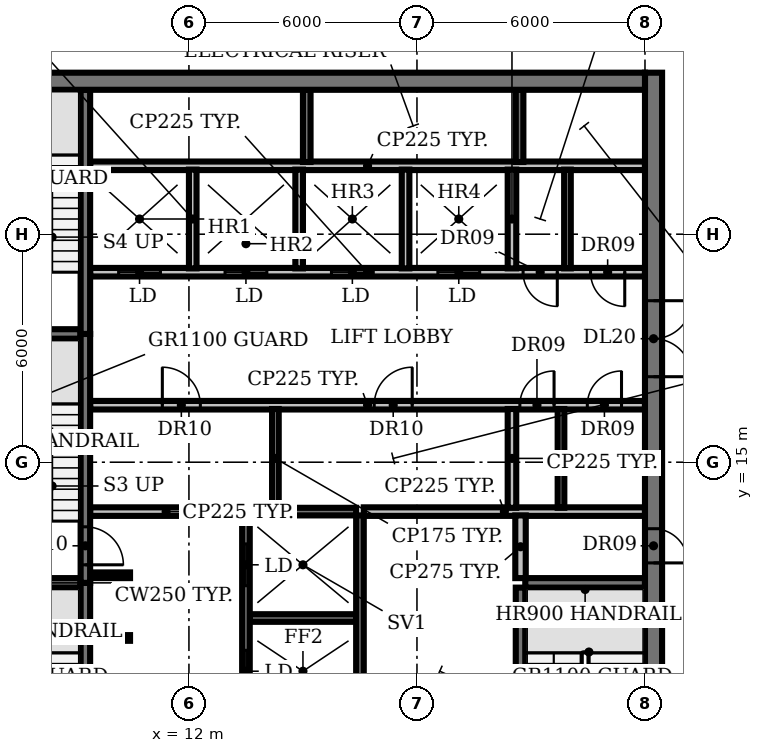
"""IFC4 building model, lengths in metres.
Left out: names, types, materials, properties, quantities, classifications, styles, units other than length and angle.
Written with IfcOpenShell. Run it as: python <this file> out.ifc"""

import sys

from ifc_helpers import new_model, si_unit, direction, frame, frame_2d, origin, place, context, subcontext, project, spatial, rectangle, extrude, element, fill, save


model = new_model("IFC4")
c1 = context("Model", 3, precision=1e-05, world=origin(), true_north=direction((0.0, 1.0)))
c2 = subcontext(c1, "Body", "Model", "MODEL_VIEW")
j1 = project(units=[si_unit("LENGTHUNIT", "METRE"), si_unit("PLANEANGLEUNIT", "RADIAN")], contexts=[c1])
p1 = place(None, origin())
s1 = spatial("IfcSite", under=j1, at=p1, CompositionType="ELEMENT")
p2 = place(p1, origin())
s2 = spatial("IfcBuilding", under=s1, at=p2, CompositionType="ELEMENT")
p3 = place(p2, frame((0.0, 0.0, 218.0)))
s3 = spatial("IfcBuildingStorey", under=s2, at=p3, CompositionType="ELEMENT", Elevation=218.0)
p4 = place(p3, frame((9.4, 10.375, 0.0), z_axis=(0.0, 0.0, 1.0), x_axis=(1.0, 0.0, 0.0)))
e1 = element("IfcWall", 1, at=p4, inside=s3, PredefinedType="SHEAR", context=c2, shape_type="SweptSolid", body=[
    extrude(rectangle(XDim=1.05, YDim=0.15, at=frame_2d((0.525, 0.0))), origin(), (0.0, 0.0, 1.0), 3.85),
])
p5 = place(p3, frame((13.6, 10.9, 0.0), z_axis=(0.0, 0.0, 1.0), x_axis=(1.0, 0.0, 0.0)))
e2 = element("IfcWall", 2, at=p5, inside=s3, PredefinedType="SHEAR", context=c2, shape_type="SweptSolid", body=[
    extrude(rectangle(XDim=2.8, YDim=0.2, at=frame_2d((1.4, 0.0))), origin(), (0.0, 0.0, 1.0), 3.85),
])
for number, where, z_axis, x_axis in (
    (3, (6.0, 11.825, 0.0), (0.0, 0.0, 1.0), (1.0, 0.0, 0.0)),
    (4, (20.85, 11.825, 0.0), (0.0, 0.0, 1.0), (1.0, 0.0, 0.0)),
):
    element("IfcWall", number, at=place(p3, frame(where, z_axis=z_axis, x_axis=x_axis)), inside=s3, PredefinedType="SHEAR", context=c2, shape_type="SweptSolid", body=[
        extrude(rectangle(XDim=3.15, YDim=0.25, at=frame_2d((1.575, 0.0))), origin(), (0.0, 0.0, 1.0), 3.85),
    ])
p6 = place(p3, frame((9.4, 12.025, 0.0), z_axis=(0.0, 0.0, 1.0), x_axis=(1.0, 0.0, 0.0)))
e5 = element("IfcWall", 5, at=p6, inside=s3, PredefinedType="SHEAR", context=c2, shape_type="SweptSolid", body=[
    extrude(rectangle(XDim=1.05, YDim=0.15, at=frame_2d((0.525, 0.0))), origin(), (0.0, 0.0, 1.0), 3.85),
])
p7 = place(p3, frame((9.4, 13.7, 0.0), z_axis=(0.0, 0.0, 1.0), x_axis=(1.0, 0.0, 0.0)))
e6 = element("IfcWall", 6, at=p7, inside=s3, PredefinedType="PARTITIONING", context=c2, shape_type="SweptSolid", body=[
    extrude(rectangle(XDim=4.0, YDim=0.225, at=frame_2d((2.0, 0.0))), origin(), (0.0, 0.0, 1.0), 3.85),
])
p8 = place(p3, frame((13.6, 13.7, 0.0), z_axis=(0.0, 0.0, 1.0), x_axis=(1.0, 0.0, 0.0)))
e7 = element("IfcWall", 7, at=p8, inside=s3, PredefinedType="SHEAR", context=c2, shape_type="SweptSolid", body=[
    extrude(rectangle(XDim=2.8, YDim=0.2, at=frame_2d((1.4, 0.0))), origin(), (0.0, 0.0, 1.0), 3.85),
])
p9 = place(p3, frame((16.6, 13.7, 0.0), z_axis=(0.0, 0.0, 1.0), x_axis=(1.0, 0.0, 0.0)))
e8 = element("IfcWall", 8, at=p9, inside=s3, PredefinedType="PARTITIONING", context=c2, shape_type="SweptSolid", body=[
    extrude(rectangle(XDim=7.4, YDim=0.225, at=frame_2d((3.7, 0.0))), origin(), (0.0, 0.0, 1.0), 3.85),
])
p10 = place(p3, frame((9.4, 16.5, 0.0), z_axis=(0.0, 0.0, 1.0), x_axis=(1.0, 0.0, 0.0)))
e9 = element("IfcWall", 9, at=p10, inside=s3, PredefinedType="PARTITIONING", context=c2, shape_type="SweptSolid", body=[
    extrude(rectangle(XDim=14.6, YDim=0.225, at=frame_2d((7.3, 0.0))), origin(), (0.0, 0.0, 1.0), 3.85),
])
p11 = place(p10, frame((1.9, 0.0, 0.0)))
e10 = element("IfcOpeningElement", 10, at=p11, cuts=e9, PredefinedType="OPENING", context=c2, shape_type="SweptSolid", body=[
    extrude(rectangle(XDim=1.0, YDim=2.1, at=frame_2d((0.5, 1.05))), frame((0.0, 0.123, 0.0), z_axis=(0.0, -1.0, 0.0), x_axis=(1.0, 0.0, 0.0)), (0.0, 0.0, 1.0), 0.245),
])
p12 = place(p10, frame((7.475, 0.0, 0.0)))
e11 = element("IfcOpeningElement", 11, at=p12, cuts=e9, PredefinedType="OPENING", context=c2, shape_type="SweptSolid", body=[
    extrude(rectangle(XDim=1.0, YDim=2.1, at=frame_2d((0.5, 1.05))), frame((0.0, 0.123, 0.0), z_axis=(0.0, -1.0, 0.0), x_axis=(1.0, 0.0, 0.0)), (0.0, 0.0, 1.0), 0.245),
])
p13 = place(p10, frame((11.308, 0.0, 0.0)))
e12 = element("IfcOpeningElement", 12, at=p13, cuts=e9, PredefinedType="OPENING", context=c2, shape_type="SweptSolid", body=[
    extrude(rectangle(XDim=0.9, YDim=2.1, at=frame_2d((0.45, 1.05))), frame((0.0, 0.123, 0.0), z_axis=(0.0, -1.0, 0.0), x_axis=(1.0, 0.0, 0.0)), (0.0, 0.0, 1.0), 0.245),
])
p14 = place(p10, frame((13.083, 0.0, 0.0)))
e13 = element("IfcOpeningElement", 13, at=p14, cuts=e9, PredefinedType="OPENING", context=c2, shape_type="SweptSolid", body=[
    extrude(rectangle(XDim=0.9, YDim=2.1, at=frame_2d((0.45, 1.05))), frame((0.0, 0.123, 0.0), z_axis=(0.0, -1.0, 0.0), x_axis=(1.0, 0.0, 0.0)), (0.0, 0.0, 1.0), 0.245),
])
p15 = place(p3, frame((6.0, 18.375, 0.0), z_axis=(0.0, 0.0, 1.0), x_axis=(1.0, 0.0, 0.0)))
e14 = element("IfcWall", 14, at=p15, inside=s3, PredefinedType="SHEAR", context=c2, shape_type="SweptSolid", body=[
    extrude(rectangle(XDim=3.15, YDim=0.25, at=frame_2d((1.575, 0.0))), origin(), (0.0, 0.0, 1.0), 3.85),
])
p16 = place(p3, frame((24.0, 20.0, 0.0), z_axis=(0.0, 0.0, 1.0), x_axis=(-1.0, 0.0, 0.0)))
e15 = element("IfcWall", 15, at=p16, inside=s3, PredefinedType="PARTITIONING", context=c2, shape_type="SweptSolid", body=[
    extrude(rectangle(XDim=14.6, YDim=0.225, at=frame_2d((7.3, 0.0))), origin(), (0.0, 0.0, 1.0), 3.85),
])
p17 = place(p16, frame((12.75, 0.0, 0.0)))
e16 = element("IfcOpeningElement", 16, at=p17, cuts=e15, PredefinedType="OPENING", context=c2, shape_type="SweptSolid", body=[
    extrude(rectangle(XDim=1.1, YDim=2.1, at=frame_2d((0.55, 1.05))), frame((0.0, 0.123, 0.0), z_axis=(0.0, -1.0, 0.0), x_axis=(1.0, 0.0, 0.0)), (0.0, 0.0, 1.0), 0.245),
])
p18 = place(p16, frame((9.95, 0.0, 0.0)))
e17 = element("IfcOpeningElement", 17, at=p18, cuts=e15, PredefinedType="OPENING", context=c2, shape_type="SweptSolid", body=[
    extrude(rectangle(XDim=1.1, YDim=2.1, at=frame_2d((0.55, 1.05))), frame((0.0, 0.123, 0.0), z_axis=(0.0, -1.0, 0.0), x_axis=(1.0, 0.0, 0.0)), (0.0, 0.0, 1.0), 0.245),
])
p19 = place(p16, frame((7.15, 0.0, 0.0)))
e18 = element("IfcOpeningElement", 18, at=p19, cuts=e15, PredefinedType="OPENING", context=c2, shape_type="SweptSolid", body=[
    extrude(rectangle(XDim=1.1, YDim=2.1, at=frame_2d((0.55, 1.05))), frame((0.0, 0.123, 0.0), z_axis=(0.0, -1.0, 0.0), x_axis=(1.0, 0.0, 0.0)), (0.0, 0.0, 1.0), 0.245),
])
p20 = place(p16, frame((4.35, 0.0, 0.0)))
e19 = element("IfcOpeningElement", 19, at=p20, cuts=e15, PredefinedType="OPENING", context=c2, shape_type="SweptSolid", body=[
    extrude(rectangle(XDim=1.1, YDim=2.1, at=frame_2d((0.55, 1.05))), frame((0.0, 0.123, 0.0), z_axis=(0.0, -1.0, 0.0), x_axis=(1.0, 0.0, 0.0)), (0.0, 0.0, 1.0), 0.245),
])
p21 = place(p16, frame((2.308, 0.0, 0.0)))
e20 = element("IfcOpeningElement", 20, at=p21, cuts=e15, PredefinedType="OPENING", context=c2, shape_type="SweptSolid", body=[
    extrude(rectangle(XDim=0.9, YDim=2.1, at=frame_2d((0.45, 1.05))), frame((0.0, 0.123, 0.0), z_axis=(0.0, -1.0, 0.0), x_axis=(1.0, 0.0, 0.0)), (0.0, 0.0, 1.0), 0.245),
])
p22 = place(p16, frame((0.532, 0.0, 0.0)))
e21 = element("IfcOpeningElement", 21, at=p22, cuts=e15, PredefinedType="OPENING", context=c2, shape_type="SweptSolid", body=[
    extrude(rectangle(XDim=0.9, YDim=2.1, at=frame_2d((0.45, 1.05))), frame((0.0, 0.123, 0.0), z_axis=(0.0, -1.0, 0.0), x_axis=(1.0, 0.0, 0.0)), (0.0, 0.0, 1.0), 0.245),
])
p23 = place(p3, frame((9.4, 22.8, 0.0), z_axis=(0.0, 0.0, 1.0), x_axis=(1.0, 0.0, 0.0)))
e22 = element("IfcWall", 22, at=p23, inside=s3, PredefinedType="PARTITIONING", context=c2, shape_type="SweptSolid", body=[
    extrude(rectangle(XDim=14.6, YDim=0.225, at=frame_2d((7.3, 0.0))), origin(), (0.0, 0.0, 1.0), 3.85),
])
p24 = place(p3, frame((9.275, 11.825, 0.0), z_axis=(0.0, 0.0, 1.0), x_axis=(0.0, -1.0, 0.0)))
e23 = element("IfcWall", 23, at=p24, inside=s3, PredefinedType="SHEAR", context=c2, shape_type="SweptSolid", body=[
    extrude(rectangle(XDim=6.425, YDim=0.25, at=frame_2d((3.212, 0.0))), origin(), (0.0, 0.0, 1.0), 3.85),
])
p25 = place(p24, frame((5.075, 0.0, 0.0)))
e24 = element("IfcOpeningElement", 24, at=p25, cuts=e23, PredefinedType="OPENING", context=c2, shape_type="SweptSolid", body=[
    extrude(rectangle(XDim=1.0, YDim=2.1, at=frame_2d((0.5, 1.05))), frame((0.0, 0.135, 0.0), z_axis=(0.0, -1.0, 0.0), x_axis=(1.0, 0.0, 0.0)), (0.0, 0.0, 1.0), 0.27),
])
p26 = place(p3, frame((9.275, 18.375, 0.0), z_axis=(0.0, 0.0, 1.0), x_axis=(0.0, -1.0, 0.0)))
e25 = element("IfcWall", 25, at=p26, inside=s3, PredefinedType="SHEAR", context=c2, shape_type="SweptSolid", body=[
    extrude(rectangle(XDim=6.55, YDim=0.25, at=frame_2d((3.275, 0.0))), origin(), (0.0, 0.0, 1.0), 3.85),
])
p27 = place(p26, frame((5.075, 0.0, 0.0)))
e26 = element("IfcOpeningElement", 26, at=p27, cuts=e25, PredefinedType="OPENING", context=c2, shape_type="SweptSolid", body=[
    extrude(rectangle(XDim=1.0, YDim=2.1, at=frame_2d((0.5, 1.05))), frame((0.0, 0.135, 0.0), z_axis=(0.0, -1.0, 0.0), x_axis=(1.0, 0.0, 0.0)), (0.0, 0.0, 1.0), 0.27),
])
p28 = place(p3, frame((9.275, 18.375, 0.0), z_axis=(0.0, 0.0, 1.0), x_axis=(0.0, 1.0, 0.0)))
e27 = element("IfcWall", 27, at=p28, inside=s3, PredefinedType="SHEAR", context=c2, shape_type="SweptSolid", body=[
    extrude(rectangle(XDim=6.425, YDim=0.25, at=frame_2d((3.212, 0.0))), origin(), (0.0, 0.0, 1.0), 3.85),
])
p29 = place(p3, frame((12.1, 20.1, 0.0), z_axis=(0.0, 0.0, 1.0), x_axis=(0.0, 1.0, 0.0)))
e28 = element("IfcWall", 28, at=p29, inside=s3, PredefinedType="SOLIDWALL", context=c2, shape_type="SweptSolid", body=[
    extrude(rectangle(XDim=2.6, YDim=0.2, at=frame_2d((1.3, 0.0))), origin(), (0.0, 0.0, 1.0), 3.85),
])
p30 = place(p3, frame((13.5, 5.4, 0.0), z_axis=(0.0, 0.0, 1.0), x_axis=(0.0, 1.0, 0.0)))
e29 = element("IfcWall", 29, at=p30, inside=s3, PredefinedType="SHEAR", context=c2, shape_type="SweptSolid", body=[
    extrude(rectangle(XDim=8.2, YDim=0.2, at=frame_2d((4.1, 0.0))), origin(), (0.0, 0.0, 1.0), 3.85),
])
p31 = place(p30, frame((0.75, 0.0, 0.0)))
e30 = element("IfcOpeningElement", 30, at=p31, cuts=e29, PredefinedType="OPENING", context=c2, shape_type="SweptSolid", body=[
    extrude(rectangle(XDim=1.1, YDim=2.1, at=frame_2d((0.55, 1.05))), frame((0.0, 0.11, 0.0), z_axis=(0.0, -1.0, 0.0), x_axis=(1.0, 0.0, 0.0)), (0.0, 0.0, 1.0), 0.22),
])
p32 = place(p30, frame((3.55, 0.0, 0.0)))
e31 = element("IfcOpeningElement", 31, at=p32, cuts=e29, PredefinedType="OPENING", context=c2, shape_type="SweptSolid", body=[
    extrude(rectangle(XDim=1.1, YDim=2.1, at=frame_2d((0.55, 1.05))), frame((0.0, 0.11, 0.0), z_axis=(0.0, -1.0, 0.0), x_axis=(1.0, 0.0, 0.0)), (0.0, 0.0, 1.0), 0.22),
])
p33 = place(p30, frame((6.35, 0.0, 0.0)))
e32 = element("IfcOpeningElement", 32, at=p33, cuts=e29, PredefinedType="OPENING", context=c2, shape_type="SweptSolid", body=[
    extrude(rectangle(XDim=1.1, YDim=2.1, at=frame_2d((0.55, 1.05))), frame((0.0, 0.11, 0.0), z_axis=(0.0, -1.0, 0.0), x_axis=(1.0, 0.0, 0.0)), (0.0, 0.0, 1.0), 0.22),
])
p34 = place(p3, frame((14.275, 13.8, 0.0), z_axis=(0.0, 0.0, 1.0), x_axis=(0.0, 1.0, 0.0)))
e33 = element("IfcWall", 33, at=p34, inside=s3, PredefinedType="PARTITIONING", context=c2, shape_type="SweptSolid", body=[
    extrude(rectangle(XDim=2.6, YDim=0.175, at=frame_2d((1.3, 0.0))), origin(), (0.0, 0.0, 1.0), 3.85),
])
p35 = place(p3, frame((14.9, 20.1, 0.0), z_axis=(0.0, 0.0, 1.0), x_axis=(0.0, 1.0, 0.0)))
e34 = element("IfcWall", 34, at=p35, inside=s3, PredefinedType="SOLIDWALL", context=c2, shape_type="SweptSolid", body=[
    extrude(rectangle(XDim=2.6, YDim=0.2, at=frame_2d((1.3, 0.0))), origin(), (0.0, 0.0, 1.0), 3.85),
])
p36 = place(p3, frame((15.1, 22.9, 0.0), z_axis=(0.0, 0.0, 1.0), x_axis=(0.0, 1.0, 0.0)))
e35 = element("IfcWall", 35, at=p36, inside=s3, PredefinedType="SHEAR", context=c2, shape_type="SweptSolid", body=[
    extrude(rectangle(XDim=1.9, YDim=0.2, at=frame_2d((0.95, 0.0))), origin(), (0.0, 0.0, 1.0), 3.85),
])
p37 = place(p3, frame((16.5, 5.4, 0.0), z_axis=(0.0, 0.0, 1.0), x_axis=(0.0, 1.0, 0.0)))
e36 = element("IfcWall", 36, at=p37, inside=s3, PredefinedType="SHEAR", context=c2, shape_type="SweptSolid", body=[
    extrude(rectangle(XDim=8.2, YDim=0.2, at=frame_2d((4.1, 0.0))), origin(), (0.0, 0.0, 1.0), 3.85),
])
p38 = place(p3, frame((17.7, 20.1, 0.0), z_axis=(0.0, 0.0, 1.0), x_axis=(0.0, 1.0, 0.0)))
e37 = element("IfcWall", 37, at=p38, inside=s3, PredefinedType="SOLIDWALL", context=c2, shape_type="SweptSolid", body=[
    extrude(rectangle(XDim=2.6, YDim=0.2, at=frame_2d((1.3, 0.0))), origin(), (0.0, 0.0, 1.0), 3.85),
])
for number, where, z_axis, x_axis in (
    (38, (20.5, 13.8, 0.0), (0.0, 0.0, 1.0), (0.0, 1.0, 0.0)),
    (39, (20.5, 20.1, 0.0), (0.0, 0.0, 1.0), (0.0, 1.0, 0.0)),
):
    element("IfcWall", number, at=place(p3, frame(where, z_axis=z_axis, x_axis=x_axis)), inside=s3, PredefinedType="PARTITIONING", context=c2, shape_type="SweptSolid", body=[
        extrude(rectangle(XDim=2.6, YDim=0.225, at=frame_2d((1.3, 0.0))), origin(), (0.0, 0.0, 1.0), 3.85),
    ])
p39 = place(p3, frame((20.7, 22.9, 0.0), z_axis=(0.0, 0.0, 1.0), x_axis=(0.0, 1.0, 0.0)))
e40 = element("IfcWall", 40, at=p39, inside=s3, PredefinedType="SHEAR", context=c2, shape_type="SweptSolid", body=[
    extrude(rectangle(XDim=1.9, YDim=0.2, at=frame_2d((0.95, 0.0))), origin(), (0.0, 0.0, 1.0), 3.85),
])
p40 = place(p3, frame((20.725, 5.4, 0.0), z_axis=(0.0, 0.0, 1.0), x_axis=(0.0, 1.0, 0.0)))
e41 = element("IfcWall", 41, at=p40, inside=s3, PredefinedType="SHEAR", context=c2, shape_type="SweptSolid", body=[
    extrude(rectangle(XDim=6.3, YDim=0.25, at=frame_2d((3.15, 0.0))), origin(), (0.0, 0.0, 1.0), 3.85),
])
p41 = place(p3, frame((20.725, 11.95, 0.0), z_axis=(0.0, 0.0, 1.0), x_axis=(0.0, 1.0, 0.0)))
e42 = element("IfcWall", 42, at=p41, inside=s3, PredefinedType="PARTITIONING", context=c2, shape_type="SweptSolid", body=[
    extrude(rectangle(XDim=1.65, YDim=0.275, at=frame_2d((0.825, 0.0))), origin(), (0.0, 0.0, 1.0), 3.85),
])
for number, where, z_axis, x_axis in (
    (43, (21.79, 13.8, 0.0), (0.0, 0.0, 1.0), (0.0, 1.0, 0.0)),
    (44, (21.96, 20.1, 0.0), (0.0, 0.0, 1.0), (0.0, 1.0, 0.0)),
):
    element("IfcWall", number, at=place(p3, frame(where, z_axis=z_axis, x_axis=x_axis)), inside=s3, PredefinedType="PARTITIONING", context=c2, shape_type="SweptSolid", body=[
        extrude(rectangle(XDim=2.6, YDim=0.175, at=frame_2d((1.3, 0.0))), origin(), (0.0, 0.0, 1.0), 3.85),
    ])
p42 = place(p3, frame((24.225, 25.25, 0.0), z_axis=(0.0, 0.0, 1.0), x_axis=(0.0, -1.0, 0.0)))
e45 = element("IfcWall", 45, at=p42, inside=s3, PredefinedType="SHEAR", context=c2, shape_type="SweptSolid", body=[
    extrude(rectangle(XDim=20.83, YDim=0.45, at=frame_2d((10.415, 0.0))), origin(), (0.0, 0.0, 1.0), 3.85),
])
p43 = place(p42, frame((18.1, 0.0, 0.0)))
e46 = element("IfcOpeningElement", 46, at=p43, cuts=e45, PredefinedType="OPENING", context=c2, shape_type="SweptSolid", body=[
    extrude(rectangle(XDim=1.5, YDim=2.1, at=frame_2d((0.75, 1.05))), frame((0.0, 0.235, 0.0), z_axis=(0.0, -1.0, 0.0), x_axis=(1.0, 0.0, 0.0)), (0.0, 0.0, 1.0), 0.47),
])
p44 = place(p42, frame((12.0, 0.0, 0.0)))
e47 = element("IfcOpeningElement", 47, at=p44, cuts=e45, PredefinedType="OPENING", context=c2, shape_type="SweptSolid", body=[
    extrude(rectangle(XDim=0.9, YDim=2.1, at=frame_2d((0.45, 1.05))), frame((0.0, 0.235, 0.0), z_axis=(0.0, -1.0, 0.0), x_axis=(1.0, 0.0, 0.0)), (0.0, 0.0, 1.0), 0.47),
])
p45 = place(p42, frame((6.0, 0.0, 0.0)))
e48 = element("IfcOpeningElement", 48, at=p45, cuts=e45, PredefinedType="OPENING", context=c2, shape_type="SweptSolid", body=[
    extrude(rectangle(XDim=2.0, YDim=2.1, at=frame_2d((1.0, 1.05))), frame((0.0, 0.235, 0.0), z_axis=(0.0, -1.0, 0.0), x_axis=(1.0, 0.0, 0.0)), (0.0, 0.0, 1.0), 0.47),
])
p46 = place(p3, frame((6.0, 25.025, 0.0), z_axis=(0.0, 0.0, 1.0), x_axis=(1.0, 0.0, 0.0)))
e49 = element("IfcWall", 49, at=p46, inside=s3, PredefinedType="SHEAR", context=c2, shape_type="SweptSolid", body=[
    extrude(rectangle(XDim=18.0, YDim=0.45, at=frame_2d((9.0, 0.0))), origin(), (0.0, 0.0, 1.0), 3.85),
])
p47 = place(p11, origin())
e50 = element("IfcDoor", 50, at=p47, inside=s3, OperationType="SINGLE_SWING_LEFT", PredefinedType="DOOR", context=c2, shape_type="SweptSolid", body=[
    extrude(rectangle(XDim=1.0, YDim=2.1, at=frame_2d((0.5, 1.05))), frame((0.0, 0.025, 0.0), z_axis=(0.0, -1.0, 0.0), x_axis=(1.0, 0.0, 0.0)), (0.0, 0.0, 1.0), 0.05),
])
fill(e10, e50)
p48 = place(p12, origin())
e51 = element("IfcDoor", 51, at=p48, inside=s3, OperationType="SINGLE_SWING_RIGHT", PredefinedType="DOOR", context=c2, shape_type="SweptSolid", body=[
    extrude(rectangle(XDim=1.0, YDim=2.1, at=frame_2d((0.5, 1.05))), frame((0.0, 0.025, 0.0), z_axis=(0.0, -1.0, 0.0), x_axis=(1.0, 0.0, 0.0)), (0.0, 0.0, 1.0), 0.05),
])
fill(e11, e51)
p49 = place(p13, origin())
e52 = element("IfcDoor", 52, at=p49, inside=s3, OperationType="SINGLE_SWING_RIGHT", PredefinedType="DOOR", context=c2, shape_type="SweptSolid", body=[
    extrude(rectangle(XDim=0.9, YDim=2.1, at=frame_2d((0.45, 1.05))), frame((0.0, 0.025, 0.0), z_axis=(0.0, -1.0, 0.0), x_axis=(1.0, 0.0, 0.0)), (0.0, 0.0, 1.0), 0.05),
])
fill(e12, e52)
p50 = place(p14, origin())
e53 = element("IfcDoor", 53, at=p50, inside=s3, OperationType="SINGLE_SWING_RIGHT", PredefinedType="DOOR", context=c2, shape_type="SweptSolid", body=[
    extrude(rectangle(XDim=0.9, YDim=2.1, at=frame_2d((0.45, 1.05))), frame((0.0, 0.025, 0.0), z_axis=(0.0, -1.0, 0.0), x_axis=(1.0, 0.0, 0.0)), (0.0, 0.0, 1.0), 0.05),
])
fill(e13, e53)
p51 = place(p17, origin())
e54 = element("IfcDoor", 54, at=p51, inside=s3, OperationType="DOUBLE_DOOR_SLIDING", PredefinedType="DOOR", context=c2, shape_type="SweptSolid", body=[
    extrude(rectangle(XDim=1.1, YDim=2.1, at=frame_2d((0.55, 1.05))), frame((0.0, 0.025, 0.0), z_axis=(0.0, -1.0, 0.0), x_axis=(1.0, 0.0, 0.0)), (0.0, 0.0, 1.0), 0.05),
])
fill(e16, e54)
p52 = place(p18, origin())
e55 = element("IfcDoor", 55, at=p52, inside=s3, OperationType="DOUBLE_DOOR_SLIDING", PredefinedType="DOOR", context=c2, shape_type="SweptSolid", body=[
    extrude(rectangle(XDim=1.1, YDim=2.1, at=frame_2d((0.55, 1.05))), frame((0.0, 0.025, 0.0), z_axis=(0.0, -1.0, 0.0), x_axis=(1.0, 0.0, 0.0)), (0.0, 0.0, 1.0), 0.05),
])
fill(e17, e55)
p53 = place(p19, origin())
e56 = element("IfcDoor", 56, at=p53, inside=s3, OperationType="DOUBLE_DOOR_SLIDING", PredefinedType="DOOR", context=c2, shape_type="SweptSolid", body=[
    extrude(rectangle(XDim=1.1, YDim=2.1, at=frame_2d((0.55, 1.05))), frame((0.0, 0.025, 0.0), z_axis=(0.0, -1.0, 0.0), x_axis=(1.0, 0.0, 0.0)), (0.0, 0.0, 1.0), 0.05),
])
fill(e18, e56)
p54 = place(p20, origin())
e57 = element("IfcDoor", 57, at=p54, inside=s3, OperationType="DOUBLE_DOOR_SLIDING", PredefinedType="DOOR", context=c2, shape_type="SweptSolid", body=[
    extrude(rectangle(XDim=1.1, YDim=2.1, at=frame_2d((0.55, 1.05))), frame((0.0, 0.025, 0.0), z_axis=(0.0, -1.0, 0.0), x_axis=(1.0, 0.0, 0.0)), (0.0, 0.0, 1.0), 0.05),
])
fill(e19, e57)
p55 = place(p21, origin())
e58 = element("IfcDoor", 58, at=p55, inside=s3, OperationType="SINGLE_SWING_LEFT", PredefinedType="DOOR", context=c2, shape_type="SweptSolid", body=[
    extrude(rectangle(XDim=0.9, YDim=2.1, at=frame_2d((0.45, 1.05))), frame((0.0, 0.025, 0.0), z_axis=(0.0, -1.0, 0.0), x_axis=(1.0, 0.0, 0.0)), (0.0, 0.0, 1.0), 0.05),
])
fill(e20, e58)
p56 = place(p22, origin())
e59 = element("IfcDoor", 59, at=p56, inside=s3, OperationType="SINGLE_SWING_LEFT", PredefinedType="DOOR", context=c2, shape_type="SweptSolid", body=[
    extrude(rectangle(XDim=0.9, YDim=2.1, at=frame_2d((0.45, 1.05))), frame((0.0, 0.025, 0.0), z_axis=(0.0, -1.0, 0.0), x_axis=(1.0, 0.0, 0.0)), (0.0, 0.0, 1.0), 0.05),
])
fill(e21, e59)
p57 = place(p27, origin())
e60 = element("IfcDoor", 60, at=p57, inside=s3, OperationType="SINGLE_SWING_RIGHT", PredefinedType="DOOR", context=c2, shape_type="SweptSolid", body=[
    extrude(rectangle(XDim=1.0, YDim=2.1, at=frame_2d((0.5, 1.05))), frame((0.0, 0.025, 0.0), z_axis=(0.0, -1.0, 0.0), x_axis=(1.0, 0.0, 0.0)), (0.0, 0.0, 1.0), 0.05),
])
fill(e26, e60)
p58 = place(p32, origin())
e61 = element("IfcDoor", 61, at=p58, inside=s3, OperationType="DOUBLE_DOOR_SLIDING", PredefinedType="DOOR", context=c2, shape_type="SweptSolid", body=[
    extrude(rectangle(XDim=1.1, YDim=2.1, at=frame_2d((0.55, 1.05))), frame((0.0, 0.025, 0.0), z_axis=(0.0, -1.0, 0.0), x_axis=(1.0, 0.0, 0.0)), (0.0, 0.0, 1.0), 0.05),
])
fill(e31, e61)
p59 = place(p33, origin())
e62 = element("IfcDoor", 62, at=p59, inside=s3, OperationType="DOUBLE_DOOR_SLIDING", PredefinedType="DOOR", context=c2, shape_type="SweptSolid", body=[
    extrude(rectangle(XDim=1.1, YDim=2.1, at=frame_2d((0.55, 1.05))), frame((0.0, 0.025, 0.0), z_axis=(0.0, -1.0, 0.0), x_axis=(1.0, 0.0, 0.0)), (0.0, 0.0, 1.0), 0.05),
])
fill(e32, e62)
p60 = place(p44, origin())
e63 = element("IfcDoor", 63, at=p60, inside=s3, OperationType="SINGLE_SWING_RIGHT", PredefinedType="DOOR", context=c2, shape_type="SweptSolid", body=[
    extrude(rectangle(XDim=0.9, YDim=2.1, at=frame_2d((0.45, 1.05))), frame((0.0, 0.025, 0.0), z_axis=(0.0, -1.0, 0.0), x_axis=(1.0, 0.0, 0.0)), (0.0, 0.0, 1.0), 0.05),
])
fill(e47, e63)
p61 = place(p45, origin())
e64 = element("IfcDoor", 64, at=p61, inside=s3, OperationType="DOUBLE_DOOR_SINGLE_SWING", PredefinedType="DOOR", context=c2, shape_type="SweptSolid", body=[
    extrude(rectangle(XDim=2.0, YDim=2.1, at=frame_2d((1.0, 1.05))), frame((0.0, 0.025, 0.0), z_axis=(0.0, -1.0, 0.0), x_axis=(1.0, 0.0, 0.0)), (0.0, 0.0, 1.0), 0.05),
])
fill(e48, e64)
save(model, sys.argv[1])
